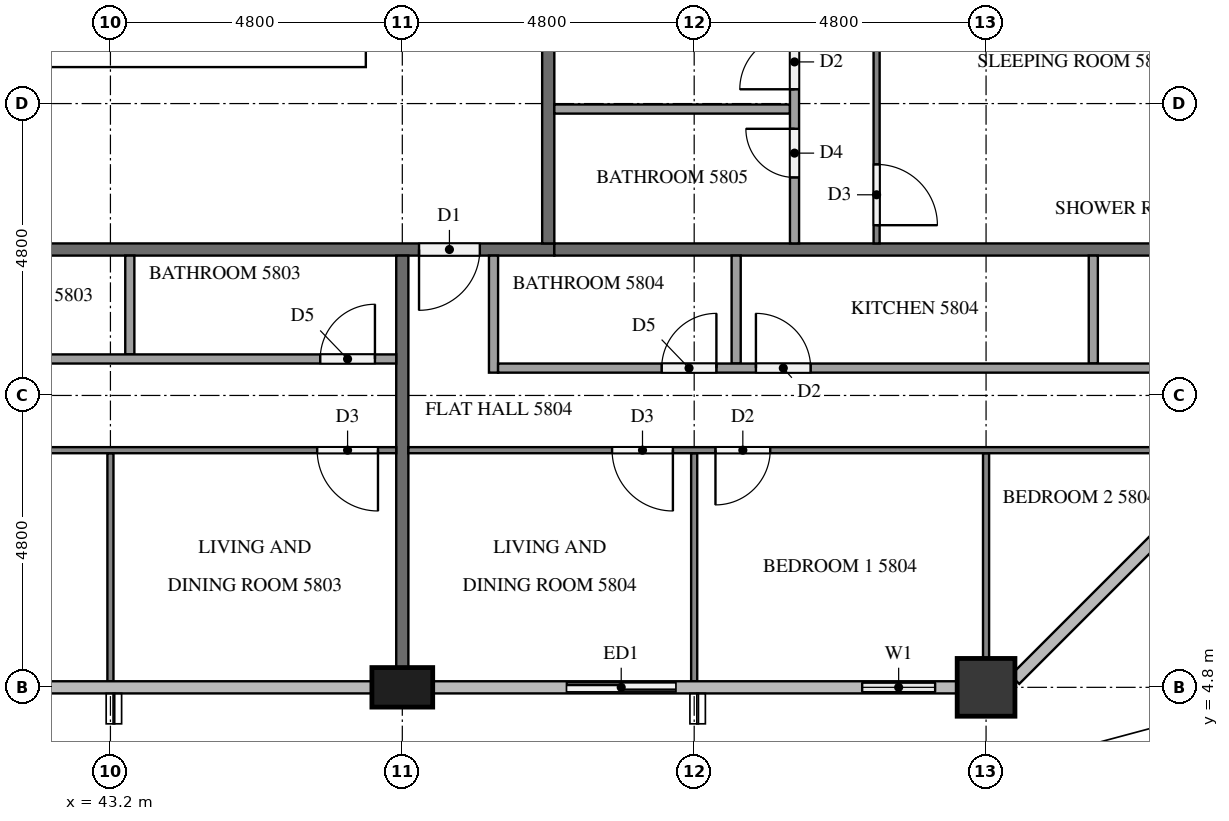
"""IFC4 building model, lengths in metres.
Left out: names, types, materials, properties, quantities, classifications, styles, units other than length and angle.
Written with IfcOpenShell. Run it as: python <this file> out.ifc"""

import sys

from ifc_helpers import new_model, si_unit, direction, frame, frame_2d, origin, origin_2d, place, context, subcontext, project, spatial, rectangle, extrude, element, fill, save


model = new_model("IFC4")
c1 = context("Model", 3, precision=1e-05, world=origin(), true_north=direction((0.0, 1.0)))
c2 = subcontext(c1, "Body", "Model", "MODEL_VIEW")
j1 = project(units=[si_unit("LENGTHUNIT", "METRE"), si_unit("PLANEANGLEUNIT", "RADIAN")], contexts=[c1])
p1 = place(None, origin())
s1 = spatial("IfcSite", under=j1, at=p1, CompositionType="ELEMENT")
p2 = place(p1, origin())
s2 = spatial("IfcBuilding", under=s1, at=p2, CompositionType="ELEMENT")
p3 = place(p2, frame((0.0, 0.0, 222.8)))
s3 = spatial("IfcBuildingStorey", under=s2, at=p3, CompositionType="ELEMENT", Elevation=222.8)
p4 = place(p3, frame((15.0, 15.35, 0.0), z_axis=(0.0, 0.0, 1.0), x_axis=(1.0, 0.0, 0.0)))
e1 = element("IfcWall", 1, at=p4, inside=s3, PredefinedType="SHEAR", context=c2, shape_type="SweptSolid", body=[
    extrude(rectangle(XDim=32.4, YDim=0.7, at=frame_2d((16.2, 0.0))), origin(), (0.0, 0.0, 1.0), 3.2),
])
p5 = place(p4, frame((15.3, 0.0, 0.0)))
e2 = element("IfcOpeningElement", 2, at=p5, cuts=e1, PredefinedType="OPENING", context=c2, shape_type="SweptSolid", body=[
    extrude(rectangle(XDim=1.8, YDim=2.1, at=frame_2d((0.9, 1.05))), frame((0.0, 0.36, 0.0), z_axis=(0.0, -1.0, 0.0), x_axis=(1.0, 0.0, 0.0)), (0.0, 0.0, 1.0), 0.72),
])
p6 = place(p3, frame((48.0, 4.8, 0.0), z_axis=(0.0, 0.0, 1.0), x_axis=(1.0, 0.0, 0.0)))
e3 = element("IfcColumn", 3, at=p6, inside=s3, PredefinedType="COLUMN", context=c2, shape_type="SweptSolid", body=[
    extrude(rectangle(XDim=1.0, YDim=0.65, at=origin_2d()), origin(), (0.0, 0.0, 1.0), 3.2),
])
p7 = place(p3, frame((57.6, 4.8, 0.0), z_axis=(0.0, 0.0, 1.0), x_axis=(1.0, 0.0, 0.0)))
e4 = element("IfcColumn", 4, at=p7, inside=s3, PredefinedType="COLUMN", context=c2, shape_type="SweptSolid", body=[
    extrude(rectangle(XDim=0.95, YDim=0.95, at=origin_2d()), origin(), (0.0, 0.0, 1.0), 3.2),
])
p8 = place(p3, frame((50.4, 4.8, 0.0), z_axis=(0.0, 0.0, 1.0), x_axis=(1.0, 0.0, 0.0)))
e5 = element("IfcWall", 5, at=p8, inside=s3, PredefinedType="SOLIDWALL", context=c2, shape_type="SweptSolid", body=[
    extrude(rectangle(XDim=2.4, YDim=0.15, at=frame_2d((1.2, 0.0))), origin(), (0.0, 0.0, 1.0), 3.2),
])
p9 = place(p8, frame((0.3, 0.0, 0.0)))
e6 = element("IfcOpeningElement", 6, at=p9, cuts=e5, PredefinedType="OPENING", context=c2, shape_type="SweptSolid", body=[
    extrude(rectangle(XDim=1.8, YDim=2.4, at=frame_2d((0.9, 1.2))), frame((0.0, 0.085, 0.0), z_axis=(0.0, -1.0, 0.0), x_axis=(1.0, 0.0, 0.0)), (0.0, 0.0, 1.0), 0.17),
])
p10 = place(p3, frame((55.2, 4.8, 0.0), z_axis=(0.0, 0.0, 1.0), x_axis=(1.0, 0.0, 0.0)))
e7 = element("IfcWall", 7, at=p10, inside=s3, PredefinedType="SOLIDWALL", context=c2, shape_type="SweptSolid", body=[
    extrude(rectangle(XDim=1.925, YDim=0.15, at=frame_2d((0.962, 0.0))), origin(), (0.0, 0.0, 1.0), 3.2),
])
p11 = place(p10, frame((0.363, 0.0, 0.9)))
e8 = element("IfcOpeningElement", 8, at=p11, cuts=e7, PredefinedType="OPENING", context=c2, shape_type="SweptSolid", body=[
    extrude(rectangle(XDim=1.2, YDim=1.4, at=frame_2d((0.6, 0.7))), frame((0.0, 0.085, 0.0), z_axis=(0.0, -1.0, 0.0), x_axis=(1.0, 0.0, 0.0)), (0.0, 0.0, 1.0), 0.17),
])
p12 = place(p3, frame((50.5, 12.0, 0.0), z_axis=(0.0, 0.0, 1.0), x_axis=(-1.0, 0.0, 0.0)))
e9 = element("IfcWall", 9, at=p12, inside=s3, PredefinedType="PARTITIONING", context=c2, shape_type="SweptSolid", body=[
    extrude(rectangle(XDim=38.6, YDim=0.2, at=frame_2d((19.3, 0.0))), origin(), (0.0, 0.0, 1.0), 3.2),
])
p13 = place(p12, frame((36.375, 0.0, 0.0)))
e10 = element("IfcOpeningElement", 10, at=p13, cuts=e9, PredefinedType="OPENING", context=c2, shape_type="SweptSolid", body=[
    extrude(rectangle(XDim=1.0, YDim=2.1, at=frame_2d((0.5, 1.05))), frame((0.0, 0.11, 0.0), z_axis=(0.0, -1.0, 0.0), x_axis=(1.0, 0.0, 0.0)), (0.0, 0.0, 1.0), 0.22),
])
p14 = place(p12, frame((34.825, 0.0, 0.0)))
e11 = element("IfcOpeningElement", 11, at=p14, cuts=e9, PredefinedType="OPENING", context=c2, shape_type="SweptSolid", body=[
    extrude(rectangle(XDim=1.0, YDim=2.1, at=frame_2d((0.5, 1.05))), frame((0.0, 0.11, 0.0), z_axis=(0.0, -1.0, 0.0), x_axis=(1.0, 0.0, 0.0)), (0.0, 0.0, 1.0), 0.22),
])
p15 = place(p12, frame((20.375, 0.0, 0.0)))
e12 = element("IfcOpeningElement", 12, at=p15, cuts=e9, PredefinedType="OPENING", context=c2, shape_type="SweptSolid", body=[
    extrude(rectangle(XDim=1.1, YDim=2.1, at=frame_2d((0.55, 1.05))), frame((0.0, 0.11, 0.0), z_axis=(0.0, -1.0, 0.0), x_axis=(1.0, 0.0, 0.0)), (0.0, 0.0, 1.0), 0.22),
])
p16 = place(p12, frame((1.225, 0.0, 0.0)))
e13 = element("IfcOpeningElement", 13, at=p16, cuts=e9, PredefinedType="OPENING", context=c2, shape_type="SweptSolid", body=[
    extrude(rectangle(XDim=1.0, YDim=2.1, at=frame_2d((0.5, 1.05))), frame((0.0, 0.11, 0.0), z_axis=(0.0, -1.0, 0.0), x_axis=(1.0, 0.0, 0.0)), (0.0, 0.0, 1.0), 0.22),
])
p17 = place(p3, frame((50.4, 40.7, 0.0), z_axis=(0.0, 0.0, 1.0), x_axis=(0.0, -1.0, 0.0)))
e14 = element("IfcWall", 14, at=p17, inside=s3, PredefinedType="PARTITIONING", context=c2, shape_type="SweptSolid", body=[
    extrude(rectangle(XDim=28.6, YDim=0.2, at=frame_2d((14.3, 0.0))), origin(), (0.0, 0.0, 1.0), 3.2),
])
p18 = place(p17, frame((21.775, 0.0, 0.0)))
e15 = element("IfcOpeningElement", 15, at=p18, cuts=e14, PredefinedType="OPENING", context=c2, shape_type="SweptSolid", body=[
    extrude(rectangle(XDim=1.0, YDim=2.1, at=frame_2d((0.5, 1.05))), frame((0.0, 0.11, 0.0), z_axis=(0.0, -1.0, 0.0), x_axis=(1.0, 0.0, 0.0)), (0.0, 0.0, 1.0), 0.22),
])
p19 = place(p17, frame((7.375, 0.0, 0.0)))
e16 = element("IfcOpeningElement", 16, at=p19, cuts=e14, PredefinedType="OPENING", context=c2, shape_type="SweptSolid", body=[
    extrude(rectangle(XDim=1.0, YDim=2.1, at=frame_2d((0.5, 1.05))), frame((0.0, 0.11, 0.0), z_axis=(0.0, -1.0, 0.0), x_axis=(1.0, 0.0, 0.0)), (0.0, 0.0, 1.0), 0.22),
])
p20 = place(p17, frame((0.175, 0.0, 0.0)))
e17 = element("IfcOpeningElement", 17, at=p20, cuts=e14, PredefinedType="OPENING", context=c2, shape_type="SweptSolid", body=[
    extrude(rectangle(XDim=1.0, YDim=2.1, at=frame_2d((0.5, 1.05))), frame((0.0, 0.11, 0.0), z_axis=(0.0, -1.0, 0.0), x_axis=(1.0, 0.0, 0.0)), (0.0, 0.0, 1.0), 0.22),
])
p21 = place(p3, frame((48.0, 11.9, 0.0), z_axis=(0.0, 0.0, 1.0), x_axis=(0.0, -1.0, 0.0)))
e18 = element("IfcWall", 18, at=p21, inside=s3, PredefinedType="PARTITIONING", context=c2, shape_type="SweptSolid", body=[
    extrude(rectangle(XDim=6.775, YDim=0.2, at=frame_2d((3.387, 0.0))), origin(), (0.0, 0.0, 1.0), 3.2),
])
p22 = place(p3, frame((50.5, 12.0, 0.0), z_axis=(0.0, 0.0, 1.0), x_axis=(1.0, 0.0, 0.0)))
e19 = element("IfcWall", 19, at=p22, inside=s3, PredefinedType="PARTITIONING", context=c2, shape_type="SweptSolid", body=[
    extrude(rectangle(XDim=11.8, YDim=0.2, at=frame_2d((5.9, 0.0))), origin(), (0.0, 0.0, 1.0), 3.2),
])
p23 = place(p3, frame((43.2, 8.65, 0.0), z_axis=(0.0, 0.0, 1.0), x_axis=(0.0, -1.0, 0.0)))
e20 = element("IfcWall", 20, at=p23, inside=s3, PredefinedType="PARTITIONING", context=c2, shape_type="SweptSolid", body=[
    extrude(rectangle(XDim=3.75, YDim=0.1, at=frame_2d((1.875, 0.0))), origin(), (0.0, 0.0, 1.0), 3.2),
])
p24 = place(p3, frame((47.9, 8.7, 0.0), z_axis=(0.0, 0.0, 1.0), x_axis=(-1.0, 0.0, 0.0)))
e21 = element("IfcWall", 21, at=p24, inside=s3, PredefinedType="PARTITIONING", context=c2, shape_type="SweptSolid", body=[
    extrude(rectangle(XDim=19.0, YDim=0.1, at=frame_2d((9.5, 0.0))), origin(), (0.0, 0.0, 1.0), 3.2),
])
p25 = place(p24, frame((17.8, 0.0, 0.0)))
e22 = element("IfcOpeningElement", 22, at=p25, cuts=e21, PredefinedType="OPENING", context=c2, shape_type="SweptSolid", body=[
    extrude(rectangle(XDim=0.9, YDim=2.1, at=frame_2d((0.45, 1.05))), frame((0.0, 0.06, 0.0), z_axis=(0.0, -1.0, 0.0), x_axis=(1.0, 0.0, 0.0)), (0.0, 0.0, 1.0), 0.12),
])
p26 = place(p24, frame((9.85, 0.0, 0.0)))
e23 = element("IfcOpeningElement", 23, at=p26, cuts=e21, PredefinedType="OPENING", context=c2, shape_type="SweptSolid", body=[
    extrude(rectangle(XDim=0.9, YDim=2.1, at=frame_2d((0.45, 1.05))), frame((0.0, 0.06, 0.0), z_axis=(0.0, -1.0, 0.0), x_axis=(1.0, 0.0, 0.0)), (0.0, 0.0, 1.0), 0.12),
])
p27 = place(p24, frame((8.25, 0.0, 0.0)))
e24 = element("IfcOpeningElement", 24, at=p27, cuts=e21, PredefinedType="OPENING", context=c2, shape_type="SweptSolid", body=[
    extrude(rectangle(XDim=0.9, YDim=2.1, at=frame_2d((0.45, 1.05))), frame((0.0, 0.06, 0.0), z_axis=(0.0, -1.0, 0.0), x_axis=(1.0, 0.0, 0.0)), (0.0, 0.0, 1.0), 0.12),
])
p28 = place(p24, frame((0.3, 0.0, 0.0)))
e25 = element("IfcOpeningElement", 25, at=p28, cuts=e21, PredefinedType="OPENING", context=c2, shape_type="SweptSolid", body=[
    extrude(rectangle(XDim=1.0, YDim=2.1, at=frame_2d((0.5, 1.05))), frame((0.0, 0.06, 0.0), z_axis=(0.0, -1.0, 0.0), x_axis=(1.0, 0.0, 0.0)), (0.0, 0.0, 1.0), 0.12),
])
p29 = place(p3, frame((43.519, 11.9, 0.0), z_axis=(0.0, 0.0, 1.0), x_axis=(0.0, -1.0, 0.0)))
e26 = element("IfcWall", 26, at=p29, inside=s3, PredefinedType="PARTITIONING", context=c2, shape_type="SweptSolid", body=[
    extrude(rectangle(XDim=1.625, YDim=0.15, at=frame_2d((0.812, 0.0))), origin(), (0.0, 0.0, 1.0), 3.2),
])
p30 = place(p3, frame((30.375, 10.2, 0.0), z_axis=(0.0, 0.0, 1.0), x_axis=(1.0, 0.0, 0.0)))
e27 = element("IfcWall", 27, at=p30, inside=s3, PredefinedType="PARTITIONING", context=c2, shape_type="SweptSolid", body=[
    extrude(rectangle(XDim=17.525, YDim=0.15, at=frame_2d((8.762, 0.0))), origin(), (0.0, 0.0, 1.0), 3.2),
])
p31 = place(p30, frame((0.3, 0.0, 0.0)))
e28 = element("IfcOpeningElement", 28, at=p31, cuts=e27, PredefinedType="OPENING", context=c2, shape_type="SweptSolid", body=[
    extrude(rectangle(XDim=0.9, YDim=2.1, at=frame_2d((0.45, 1.05))), frame((0.0, 0.085, 0.0), z_axis=(0.0, -1.0, 0.0), x_axis=(1.0, 0.0, 0.0)), (0.0, 0.0, 1.0), 0.17),
])
p32 = place(p30, frame((8.733, 0.0, 0.0)))
e29 = element("IfcOpeningElement", 29, at=p32, cuts=e27, PredefinedType="OPENING", context=c2, shape_type="SweptSolid", body=[
    extrude(rectangle(XDim=0.8, YDim=2.1, at=frame_2d((0.4, 1.05))), frame((0.0, 0.085, 0.0), z_axis=(0.0, -1.0, 0.0), x_axis=(1.0, 0.0, 0.0)), (0.0, 0.0, 1.0), 0.17),
])
p33 = place(p30, frame((10.183, 0.0, 0.0)))
e30 = element("IfcOpeningElement", 30, at=p33, cuts=e27, PredefinedType="OPENING", context=c2, shape_type="SweptSolid", body=[
    extrude(rectangle(XDim=0.8, YDim=2.1, at=frame_2d((0.4, 1.05))), frame((0.0, 0.085, 0.0), z_axis=(0.0, -1.0, 0.0), x_axis=(1.0, 0.0, 0.0)), (0.0, 0.0, 1.0), 0.17),
])
p34 = place(p30, frame((16.275, 0.0, 0.0)))
e31 = element("IfcOpeningElement", 31, at=p34, cuts=e27, PredefinedType="OPENING", context=c2, shape_type="SweptSolid", body=[
    extrude(rectangle(XDim=0.9, YDim=2.1, at=frame_2d((0.45, 1.05))), frame((0.0, 0.085, 0.0), z_axis=(0.0, -1.0, 0.0), x_axis=(1.0, 0.0, 0.0)), (0.0, 0.0, 1.0), 0.17),
])
p35 = place(p3, frame((52.8, 8.65, 0.0), z_axis=(0.0, 0.0, 1.0), x_axis=(0.0, -1.0, 0.0)))
e32 = element("IfcWall", 32, at=p35, inside=s3, PredefinedType="PARTITIONING", context=c2, shape_type="SweptSolid", body=[
    extrude(rectangle(XDim=3.75, YDim=0.1, at=frame_2d((1.875, 0.0))), origin(), (0.0, 0.0, 1.0), 3.2),
])
p36 = place(p3, frame((57.6, 8.65, 0.0), z_axis=(0.0, 0.0, 1.0), x_axis=(0.0, -1.0, 0.0)))
e33 = element("IfcWall", 33, at=p36, inside=s3, PredefinedType="PARTITIONING", context=c2, shape_type="SweptSolid", body=[
    extrude(rectangle(XDim=3.375, YDim=0.1, at=frame_2d((1.688, 0.0))), origin(), (0.0, 0.0, 1.0), 3.2),
])
p37 = place(p3, frame((62.059, 8.7, 0.0), z_axis=(0.0, 0.0, 1.0), x_axis=(-1.0, 0.0, 0.0)))
e34 = element("IfcWall", 34, at=p37, inside=s3, PredefinedType="PARTITIONING", context=c2, shape_type="SweptSolid", body=[
    extrude(rectangle(XDim=13.959, YDim=0.1, at=frame_2d((6.979, 0.0))), origin(), (0.0, 0.0, 1.0), 3.2),
])
p38 = place(p37, frame((9.609, 0.0, 0.0)))
e35 = element("IfcOpeningElement", 35, at=p38, cuts=e34, PredefinedType="OPENING", context=c2, shape_type="SweptSolid", body=[
    extrude(rectangle(XDim=1.0, YDim=2.1, at=frame_2d((0.5, 1.05))), frame((0.0, 0.06, 0.0), z_axis=(0.0, -1.0, 0.0), x_axis=(1.0, 0.0, 0.0)), (0.0, 0.0, 1.0), 0.12),
])
p39 = place(p37, frame((8.009, 0.0, 0.0)))
e36 = element("IfcOpeningElement", 36, at=p39, cuts=e34, PredefinedType="OPENING", context=c2, shape_type="SweptSolid", body=[
    extrude(rectangle(XDim=0.9, YDim=2.1, at=frame_2d((0.45, 1.05))), frame((0.0, 0.06, 0.0), z_axis=(0.0, -1.0, 0.0), x_axis=(1.0, 0.0, 0.0)), (0.0, 0.0, 1.0), 0.12),
])
p40 = place(p37, frame((0.3, 0.0, 0.0)))
e37 = element("IfcOpeningElement", 37, at=p40, cuts=e34, PredefinedType="OPENING", context=c2, shape_type="SweptSolid", body=[
    extrude(rectangle(XDim=0.9, YDim=2.1, at=frame_2d((0.45, 1.05))), frame((0.0, 0.06, 0.0), z_axis=(0.0, -1.0, 0.0), x_axis=(1.0, 0.0, 0.0)), (0.0, 0.0, 1.0), 0.12),
])
for number, where, z_axis, x_axis in (
    (38, (53.49, 11.9, 0.0), (0.0, 0.0, 1.0), (0.0, -1.0, 0.0)),
    (39, (59.364, 11.9, 0.0), (0.0, 0.0, 1.0), (0.0, -1.0, 0.0)),
):
    element("IfcWall", number, at=place(p3, frame(where, z_axis=z_axis, x_axis=x_axis)), inside=s3, PredefinedType="PARTITIONING", context=c2, shape_type="SweptSolid", body=[
        extrude(rectangle(XDim=1.775, YDim=0.15, at=frame_2d((0.887, 0.0))), origin(), (0.0, 0.0, 1.0), 3.2),
    ])
p41 = place(p3, frame((49.5, 11.9, 0.0), z_axis=(0.0, 0.0, 1.0), x_axis=(0.0, -1.0, 0.0)))
e40 = element("IfcWall", 40, at=p41, inside=s3, PredefinedType="PARTITIONING", context=c2, shape_type="SweptSolid", body=[
    extrude(rectangle(XDim=1.925, YDim=0.15, at=frame_2d((0.962, 0.0))), origin(), (0.0, 0.0, 1.0), 3.2),
])
p42 = place(p3, frame((49.575, 10.05, 0.0), z_axis=(0.0, 0.0, 1.0), x_axis=(1.0, 0.0, 0.0)))
e41 = element("IfcWall", 41, at=p42, inside=s3, PredefinedType="PARTITIONING", context=c2, shape_type="SweptSolid", body=[
    extrude(rectangle(XDim=12.35, YDim=0.15, at=frame_2d((6.175, 0.0))), origin(), (0.0, 0.0, 1.0), 3.2),
])
p43 = place(p42, frame((2.69, 0.0, 0.0)))
e42 = element("IfcOpeningElement", 42, at=p43, cuts=e41, PredefinedType="OPENING", context=c2, shape_type="SweptSolid", body=[
    extrude(rectangle(XDim=0.9, YDim=2.1, at=frame_2d((0.45, 1.05))), frame((0.0, 0.085, 0.0), z_axis=(0.0, -1.0, 0.0), x_axis=(1.0, 0.0, 0.0)), (0.0, 0.0, 1.0), 0.17),
])
p44 = place(p42, frame((4.24, 0.0, 0.0)))
e43 = element("IfcOpeningElement", 43, at=p44, cuts=e41, PredefinedType="OPENING", context=c2, shape_type="SweptSolid", body=[
    extrude(rectangle(XDim=0.9, YDim=2.1, at=frame_2d((0.45, 1.05))), frame((0.0, 0.085, 0.0), z_axis=(0.0, -1.0, 0.0), x_axis=(1.0, 0.0, 0.0)), (0.0, 0.0, 1.0), 0.17),
])
p45 = place(p42, frame((11.25, 0.0, 0.0)))
e44 = element("IfcOpeningElement", 44, at=p45, cuts=e41, PredefinedType="OPENING", context=c2, shape_type="SweptSolid", body=[
    extrude(rectangle(XDim=0.8, YDim=2.1, at=frame_2d((0.4, 1.05))), frame((0.0, 0.085, 0.0), z_axis=(0.0, -1.0, 0.0), x_axis=(1.0, 0.0, 0.0)), (0.0, 0.0, 1.0), 0.17),
])
p46 = place(p3, frame((55.8, 19.1, 0.0), z_axis=(0.0, 0.0, 1.0), x_axis=(0.0, -1.0, 0.0)))
e45 = element("IfcWall", 45, at=p46, inside=s3, PredefinedType="PARTITIONING", context=c2, shape_type="SweptSolid", body=[
    extrude(rectangle(XDim=7.0, YDim=0.1, at=frame_2d((3.5, 0.0))), origin(), (0.0, 0.0, 1.0), 3.2),
])
p47 = place(p46, frame((5.7, 0.0, 0.0)))
e46 = element("IfcOpeningElement", 46, at=p47, cuts=e45, PredefinedType="OPENING", context=c2, shape_type="SweptSolid", body=[
    extrude(rectangle(XDim=1.0, YDim=2.1, at=frame_2d((0.5, 1.05))), frame((0.0, 0.06, 0.0), z_axis=(0.0, -1.0, 0.0), x_axis=(1.0, 0.0, 0.0)), (0.0, 0.0, 1.0), 0.12),
])
p48 = place(p3, frame((50.5, 14.31, 0.0), z_axis=(0.0, 0.0, 1.0), x_axis=(1.0, 0.0, 0.0)))
e47 = element("IfcWall", 47, at=p48, inside=s3, PredefinedType="PARTITIONING", context=c2, shape_type="SweptSolid", body=[
    extrude(rectangle(XDim=3.875, YDim=0.15, at=frame_2d((1.938, 0.0))), origin(), (0.0, 0.0, 1.0), 3.2),
])
p49 = place(p3, frame((54.45, 12.1, 0.0), z_axis=(0.0, 0.0, 1.0), x_axis=(0.0, 1.0, 0.0)))
e48 = element("IfcWall", 48, at=p49, inside=s3, PredefinedType="PARTITIONING", context=c2, shape_type="SweptSolid", body=[
    extrude(rectangle(XDim=5.525, YDim=0.15, at=frame_2d((2.762, 0.0))), origin(), (0.0, 0.0, 1.0), 3.2),
])
p50 = place(p49, frame((2.535, 0.0, 0.0)))
e49 = element("IfcOpeningElement", 49, at=p50, cuts=e48, PredefinedType="OPENING", context=c2, shape_type="SweptSolid", body=[
    extrude(rectangle(XDim=0.9, YDim=2.1, at=frame_2d((0.45, 1.05))), frame((0.0, 0.085, 0.0), z_axis=(0.0, -1.0, 0.0), x_axis=(1.0, 0.0, 0.0)), (0.0, 0.0, 1.0), 0.17),
])
p51 = place(p49, frame((1.085, 0.0, 0.0)))
e50 = element("IfcOpeningElement", 50, at=p51, cuts=e48, PredefinedType="OPENING", context=c2, shape_type="SweptSolid", body=[
    extrude(rectangle(XDim=0.8, YDim=2.1, at=frame_2d((0.4, 1.05))), frame((0.0, 0.085, 0.0), z_axis=(0.0, -1.0, 0.0), x_axis=(1.0, 0.0, 0.0)), (0.0, 0.0, 1.0), 0.17),
])
p52 = place(p9, origin())
e51 = element("IfcDoor", 51, at=p52, inside=s3, OperationType="SLIDING_TO_RIGHT", PredefinedType="DOOR", context=c2, shape_type="SweptSolid", body=[
    extrude(rectangle(XDim=1.8, YDim=2.4, at=frame_2d((0.9, 1.2))), frame((0.0, 0.025, 0.0), z_axis=(0.0, -1.0, 0.0), x_axis=(1.0, 0.0, 0.0)), (0.0, 0.0, 1.0), 0.05),
])
fill(e6, e51)
p53 = place(p11, origin())
e52 = element("IfcWindow", 52, at=p53, inside=s3, PartitioningType="SINGLE_PANEL", PredefinedType="WINDOW", context=c2, shape_type="SweptSolid", body=[
    extrude(rectangle(XDim=1.2, YDim=1.4, at=frame_2d((0.6, 0.7))), frame((0.0, 0.03, 0.0), z_axis=(0.0, -1.0, 0.0), x_axis=(1.0, 0.0, 0.0)), (0.0, 0.0, 1.0), 0.06),
])
fill(e8, e52)
p54 = place(p16, origin())
e53 = element("IfcDoor", 53, at=p54, inside=s3, OperationType="SINGLE_SWING_RIGHT", PredefinedType="DOOR", context=c2, shape_type="SweptSolid", body=[
    extrude(rectangle(XDim=1.0, YDim=2.1, at=frame_2d((0.5, 1.05))), frame((0.0, 0.025, 0.0), z_axis=(0.0, -1.0, 0.0), x_axis=(1.0, 0.0, 0.0)), (0.0, 0.0, 1.0), 0.05),
])
fill(e13, e53)
p55 = place(p28, origin())
e54 = element("IfcDoor", 54, at=p55, inside=s3, OperationType="SINGLE_SWING_LEFT", PredefinedType="DOOR", context=c2, shape_type="SweptSolid", body=[
    extrude(rectangle(XDim=1.0, YDim=2.1, at=frame_2d((0.5, 1.05))), frame((0.0, 0.025, 0.0), z_axis=(0.0, -1.0, 0.0), x_axis=(1.0, 0.0, 0.0)), (0.0, 0.0, 1.0), 0.05),
])
fill(e25, e54)
p56 = place(p34, origin())
e55 = element("IfcDoor", 55, at=p56, inside=s3, OperationType="SINGLE_SWING_RIGHT", PredefinedType="DOOR", context=c2, shape_type="SweptSolid", body=[
    extrude(rectangle(XDim=0.9, YDim=2.1, at=frame_2d((0.45, 1.05))), frame((0.0, 0.025, 0.0), z_axis=(0.0, -1.0, 0.0), x_axis=(1.0, 0.0, 0.0)), (0.0, 0.0, 1.0), 0.05),
])
fill(e31, e55)
p57 = place(p38, origin())
e56 = element("IfcDoor", 56, at=p57, inside=s3, OperationType="SINGLE_SWING_LEFT", PredefinedType="DOOR", context=c2, shape_type="SweptSolid", body=[
    extrude(rectangle(XDim=1.0, YDim=2.1, at=frame_2d((0.5, 1.05))), frame((0.0, 0.025, 0.0), z_axis=(0.0, -1.0, 0.0), x_axis=(1.0, 0.0, 0.0)), (0.0, 0.0, 1.0), 0.05),
])
fill(e35, e56)
p58 = place(p39, origin())
e57 = element("IfcDoor", 57, at=p58, inside=s3, OperationType="SINGLE_SWING_RIGHT", PredefinedType="DOOR", context=c2, shape_type="SweptSolid", body=[
    extrude(rectangle(XDim=0.9, YDim=2.1, at=frame_2d((0.45, 1.05))), frame((0.0, 0.025, 0.0), z_axis=(0.0, -1.0, 0.0), x_axis=(1.0, 0.0, 0.0)), (0.0, 0.0, 1.0), 0.05),
])
fill(e36, e57)
p59 = place(p43, origin())
e58 = element("IfcDoor", 58, at=p59, inside=s3, OperationType="SINGLE_SWING_RIGHT", PredefinedType="DOOR", context=c2, shape_type="SweptSolid", body=[
    extrude(rectangle(XDim=0.9, YDim=2.1, at=frame_2d((0.45, 1.05))), frame((0.0, 0.025, 0.0), z_axis=(0.0, -1.0, 0.0), x_axis=(1.0, 0.0, 0.0)), (0.0, 0.0, 1.0), 0.05),
])
fill(e42, e58)
p60 = place(p44, origin())
e59 = element("IfcDoor", 59, at=p60, inside=s3, OperationType="SINGLE_SWING_LEFT", PredefinedType="DOOR", context=c2, shape_type="SweptSolid", body=[
    extrude(rectangle(XDim=0.9, YDim=2.1, at=frame_2d((0.45, 1.05))), frame((0.0, 0.025, 0.0), z_axis=(0.0, -1.0, 0.0), x_axis=(1.0, 0.0, 0.0)), (0.0, 0.0, 1.0), 0.05),
])
fill(e43, e59)
p61 = place(p47, origin())
e60 = element("IfcDoor", 60, at=p61, inside=s3, OperationType="SINGLE_SWING_RIGHT", PredefinedType="DOOR", context=c2, shape_type="SweptSolid", body=[
    extrude(rectangle(XDim=1.0, YDim=2.1, at=frame_2d((0.5, 1.05))), frame((0.0, 0.025, 0.0), z_axis=(0.0, -1.0, 0.0), x_axis=(1.0, 0.0, 0.0)), (0.0, 0.0, 1.0), 0.05),
])
fill(e46, e60)
p62 = place(p50, origin())
e61 = element("IfcDoor", 61, at=p62, inside=s3, OperationType="SINGLE_SWING_LEFT", PredefinedType="DOOR", context=c2, shape_type="SweptSolid", body=[
    extrude(rectangle(XDim=0.9, YDim=2.1, at=frame_2d((0.45, 1.05))), frame((0.0, 0.025, 0.0), z_axis=(0.0, -1.0, 0.0), x_axis=(1.0, 0.0, 0.0)), (0.0, 0.0, 1.0), 0.05),
])
fill(e49, e61)
p63 = place(p51, origin())
e62 = element("IfcDoor", 62, at=p63, inside=s3, OperationType="SINGLE_SWING_RIGHT", PredefinedType="DOOR", context=c2, shape_type="SweptSolid", body=[
    extrude(rectangle(XDim=0.8, YDim=2.1, at=frame_2d((0.4, 1.05))), frame((0.0, 0.025, 0.0), z_axis=(0.0, -1.0, 0.0), x_axis=(1.0, 0.0, 0.0)), (0.0, 0.0, 1.0), 0.05),
])
fill(e50, e62)
save(model, sys.argv[1])
